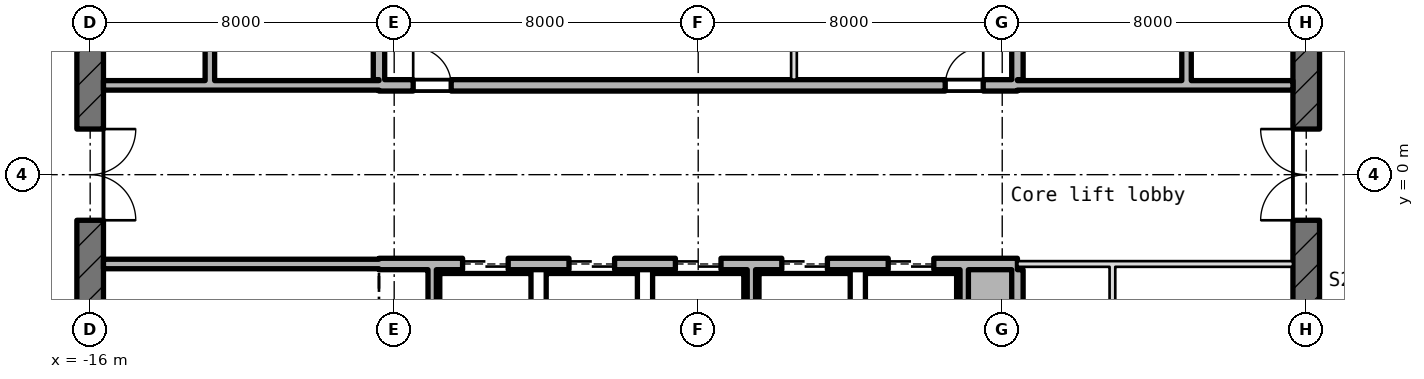
"""IFC4 building model, lengths in metres.
Left out: names, types, materials, properties, quantities, classifications, styles, units other than length and angle.
Written with IfcOpenShell. Run it as: python <this file> out.ifc"""

import sys

from ifc_helpers import new_model, si_unit, direction, frame, frame_2d, origin, place, context, subcontext, project, spatial, rectangle, extrude, element, fill, save


model = new_model("IFC4")
c1 = context("Model", 3, precision=1e-05, world=origin(), true_north=direction((0.0, 1.0)))
c2 = subcontext(c1, "Body", "Model", "MODEL_VIEW")
j1 = project(units=[si_unit("LENGTHUNIT", "METRE"), si_unit("PLANEANGLEUNIT", "RADIAN")], contexts=[c1])
p1 = place(None, origin())
s1 = spatial("IfcSite", under=j1, at=p1, CompositionType="ELEMENT")
p2 = place(p1, origin())
s2 = spatial("IfcBuilding", under=s1, at=p2, CompositionType="ELEMENT")
p3 = place(p2, frame((0.0, 0.0, 346.75)))
s3 = spatial("IfcBuildingStorey", under=s2, at=p3, CompositionType="ELEMENT", Elevation=346.75)
p4 = place(p3, frame((16.0, -10.145, -0.18), z_axis=(0.0, 0.0, 1.0), x_axis=(0.0, 1.0, 0.0)))
e1 = element("IfcWall", 1, at=p4, inside=s3, PredefinedType="SHEAR", context=c2, shape_type="SweptSolid", body=[
    extrude(rectangle(XDim=20.29, YDim=0.7, at=frame_2d((10.145, 0.0))), origin(), (0.0, 0.0, 1.0), 4.15),
])
p5 = place(p4, frame((8.945, 0.0, 0.18)))
e2 = element("IfcOpeningElement", 2, at=p5, cuts=e1, PredefinedType="OPENING", context=c2, shape_type="SweptSolid", body=[
    extrude(rectangle(XDim=2.4, YDim=2.1, at=frame_2d((1.2, 1.05))), frame((0.0, 0.36, 0.0), z_axis=(0.0, -1.0, 0.0), x_axis=(1.0, 0.0, 0.0)), (0.0, 0.0, 1.0), 0.72),
])
p6 = place(p4, frame((13.545, 0.0, 0.18)))
e3 = element("IfcOpeningElement", 3, at=p6, cuts=e1, PredefinedType="OPENING", context=c2, shape_type="SweptSolid", body=[
    extrude(rectangle(XDim=1.2, YDim=2.1, at=frame_2d((0.6, 1.05))), frame((0.0, 0.36, 0.0), z_axis=(0.0, -1.0, 0.0), x_axis=(1.0, 0.0, 0.0)), (0.0, 0.0, 1.0), 0.72),
])
p7 = place(p3, frame((-16.0, 10.145, -0.18), z_axis=(0.0, 0.0, 1.0), x_axis=(0.0, -1.0, 0.0)))
e4 = element("IfcWall", 4, at=p7, inside=s3, PredefinedType="SHEAR", context=c2, shape_type="SweptSolid", body=[
    extrude(rectangle(XDim=20.29, YDim=0.7, at=frame_2d((10.145, 0.0))), origin(), (0.0, 0.0, 1.0), 4.15),
])
p8 = place(p7, frame((8.945, 0.0, 0.18)))
e5 = element("IfcOpeningElement", 5, at=p8, cuts=e4, PredefinedType="OPENING", context=c2, shape_type="SweptSolid", body=[
    extrude(rectangle(XDim=2.4, YDim=2.1, at=frame_2d((1.2, 1.05))), frame((0.0, 0.36, 0.0), z_axis=(0.0, -1.0, 0.0), x_axis=(1.0, 0.0, 0.0)), (0.0, 0.0, 1.0), 0.72),
])
p9 = place(p7, frame((5.545, 0.0, 0.18)))
e6 = element("IfcOpeningElement", 6, at=p9, cuts=e4, PredefinedType="OPENING", context=c2, shape_type="SweptSolid", body=[
    extrude(rectangle(XDim=1.2, YDim=2.1, at=frame_2d((0.6, 1.05))), frame((0.0, 0.36, 0.0), z_axis=(0.0, -1.0, 0.0), x_axis=(1.0, 0.0, 0.0)), (0.0, 0.0, 1.0), 0.72),
])
p10 = place(p3, frame((-15.65, -2.35, 0.0), z_axis=(0.0, 0.0, 1.0), x_axis=(1.0, 0.0, 0.0)))
e7 = element("IfcWall", 7, at=p10, inside=s3, PredefinedType="STANDARD", context=c2, shape_type="SweptSolid", body=[
    extrude(rectangle(XDim=7.25, YDim=0.25, at=frame_2d((3.625, 0.0))), origin(), (0.0, 0.0, 1.0), 3.97),
])
p11 = place(p3, frame((-8.4, -2.35, -0.18), z_axis=(0.0, 0.0, 1.0), x_axis=(1.0, 0.0, 0.0)))
e8 = element("IfcWall", 8, at=p11, inside=s3, PredefinedType="SHEAR", context=c2, shape_type="SweptSolid", body=[
    extrude(rectangle(XDim=16.8, YDim=0.3, at=frame_2d((8.4, 0.0))), origin(), (0.0, 0.0, 1.0), 4.15),
])
p12 = place(p11, frame((2.2, 0.0, 0.18)))
e9 = element("IfcOpeningElement", 9, at=p12, cuts=e8, PredefinedType="OPENING", context=c2, shape_type="SweptSolid", body=[
    extrude(rectangle(XDim=1.2, YDim=2.1, at=frame_2d((0.6, 1.05))), frame((0.0, 0.16, 0.0), z_axis=(0.0, -1.0, 0.0), x_axis=(1.0, 0.0, 0.0)), (0.0, 0.0, 1.0), 0.32),
])
p13 = place(p11, frame((5.0, 0.0, 0.18)))
e10 = element("IfcOpeningElement", 10, at=p13, cuts=e8, PredefinedType="OPENING", context=c2, shape_type="SweptSolid", body=[
    extrude(rectangle(XDim=1.2, YDim=2.1, at=frame_2d((0.6, 1.05))), frame((0.0, 0.16, 0.0), z_axis=(0.0, -1.0, 0.0), x_axis=(1.0, 0.0, 0.0)), (0.0, 0.0, 1.0), 0.32),
])
p14 = place(p11, frame((7.8, 0.0, 0.18)))
e11 = element("IfcOpeningElement", 11, at=p14, cuts=e8, PredefinedType="OPENING", context=c2, shape_type="SweptSolid", body=[
    extrude(rectangle(XDim=1.2, YDim=2.1, at=frame_2d((0.6, 1.05))), frame((0.0, 0.16, 0.0), z_axis=(0.0, -1.0, 0.0), x_axis=(1.0, 0.0, 0.0)), (0.0, 0.0, 1.0), 0.32),
])
p15 = place(p11, frame((10.6, 0.0, 0.18)))
e12 = element("IfcOpeningElement", 12, at=p15, cuts=e8, PredefinedType="OPENING", context=c2, shape_type="SweptSolid", body=[
    extrude(rectangle(XDim=1.2, YDim=2.1, at=frame_2d((0.6, 1.05))), frame((0.0, 0.16, 0.0), z_axis=(0.0, -1.0, 0.0), x_axis=(1.0, 0.0, 0.0)), (0.0, 0.0, 1.0), 0.32),
])
p16 = place(p11, frame((13.4, 0.0, 0.18)))
e13 = element("IfcOpeningElement", 13, at=p16, cuts=e8, PredefinedType="OPENING", context=c2, shape_type="SweptSolid", body=[
    extrude(rectangle(XDim=1.2, YDim=2.1, at=frame_2d((0.6, 1.05))), frame((0.0, 0.16, 0.0), z_axis=(0.0, -1.0, 0.0), x_axis=(1.0, 0.0, 0.0)), (0.0, 0.0, 1.0), 0.32),
])
p17 = place(p3, frame((8.4, -2.35, 0.0), z_axis=(0.0, 0.0, 1.0), x_axis=(1.0, 0.0, 0.0)))
e14 = element("IfcWall", 14, at=p17, inside=s3, PredefinedType="PARTITIONING", context=c2, shape_type="SweptSolid", body=[
    extrude(rectangle(XDim=7.25, YDim=0.15, at=frame_2d((3.625, 0.0))), origin(), (0.0, 0.0, 1.0), 3.97),
])
p18 = place(p3, frame((-15.65, 2.35, 0.0), z_axis=(0.0, 0.0, 1.0), x_axis=(1.0, 0.0, 0.0)))
e15 = element("IfcWall", 15, at=p18, inside=s3, PredefinedType="STANDARD", context=c2, shape_type="SweptSolid", body=[
    extrude(rectangle(XDim=7.25, YDim=0.25, at=frame_2d((3.625, 0.0))), origin(), (0.0, 0.0, 1.0), 3.97),
])
p19 = place(p3, frame((-8.4, 2.35, -0.18), z_axis=(0.0, 0.0, 1.0), x_axis=(1.0, 0.0, 0.0)))
e16 = element("IfcWall", 16, at=p19, inside=s3, PredefinedType="SHEAR", context=c2, shape_type="SweptSolid", body=[
    extrude(rectangle(XDim=16.8, YDim=0.3, at=frame_2d((8.4, 0.0))), origin(), (0.0, 0.0, 1.0), 4.15),
])
p20 = place(p19, frame((0.9, 0.0, 0.18)))
e17 = element("IfcOpeningElement", 17, at=p20, cuts=e16, PredefinedType="OPENING", context=c2, shape_type="SweptSolid", body=[
    extrude(rectangle(XDim=1.0, YDim=2.1, at=frame_2d((0.5, 1.05))), frame((0.0, 0.16, 0.0), z_axis=(0.0, -1.0, 0.0), x_axis=(1.0, 0.0, 0.0)), (0.0, 0.0, 1.0), 0.32),
])
p21 = place(p19, frame((14.9, 0.0, 0.18)))
e18 = element("IfcOpeningElement", 18, at=p21, cuts=e16, PredefinedType="OPENING", context=c2, shape_type="SweptSolid", body=[
    extrude(rectangle(XDim=1.0, YDim=2.1, at=frame_2d((0.5, 1.05))), frame((0.0, 0.16, 0.0), z_axis=(0.0, -1.0, 0.0), x_axis=(1.0, 0.0, 0.0)), (0.0, 0.0, 1.0), 0.32),
])
p22 = place(p3, frame((8.4, 2.35, 0.0), z_axis=(0.0, 0.0, 1.0), x_axis=(1.0, 0.0, 0.0)))
e19 = element("IfcWall", 19, at=p22, inside=s3, PredefinedType="STANDARD", context=c2, shape_type="SweptSolid", body=[
    extrude(rectangle(XDim=7.25, YDim=0.25, at=frame_2d((3.625, 0.0))), origin(), (0.0, 0.0, 1.0), 3.97),
])
p23 = place(p3, frame((-12.85, 2.475, 0.0), z_axis=(0.0, 0.0, 1.0), x_axis=(0.0, 1.0, 0.0)))
e20 = element("IfcWall", 20, at=p23, inside=s3, PredefinedType="STANDARD", context=c2, shape_type="SweptSolid", body=[
    extrude(rectangle(XDim=3.05, YDim=0.25, at=frame_2d((1.525, 0.0))), origin(), (0.0, 0.0, 1.0), 3.97),
])
p24 = place(p3, frame((-8.4, 2.5, -0.18), z_axis=(0.0, 0.0, 1.0), x_axis=(0.0, 1.0, 0.0)))
e21 = element("IfcWall", 21, at=p24, inside=s3, PredefinedType="SHEAR", context=c2, shape_type="SweptSolid", body=[
    extrude(rectangle(XDim=5.85, YDim=0.3, at=frame_2d((2.925, 0.0))), origin(), (0.0, 0.0, 1.0), 4.15),
])
for number, where, z_axis, x_axis in (
    (22, (-7.0, -5.24, 0.0), (0.0, 0.0, 1.0), (0.0, 1.0, 0.0)),
    (23, (1.4, -5.24, 0.0), (0.0, 0.0, 1.0), (0.0, 1.0, 0.0)),
):
    element("IfcWall", number, at=place(p3, frame(where, z_axis=z_axis, x_axis=x_axis)), inside=s3, PredefinedType="STANDARD", context=c2, shape_type="SweptSolid", body=[
        extrude(rectangle(XDim=2.74, YDim=0.22, at=frame_2d((1.37, 0.0))), origin(), (0.0, 0.0, 1.0), 3.97),
    ])
p25 = place(p3, frame((2.52, 2.5, 0.0), z_axis=(0.0, 0.0, 1.0), x_axis=(0.0, 1.0, 0.0)))
e24 = element("IfcWall", 24, at=p25, inside=s3, PredefinedType="PARTITIONING", context=c2, shape_type="SweptSolid", body=[
    extrude(rectangle(XDim=2.775, YDim=0.15, at=frame_2d((1.387, 0.0))), origin(), (0.0, 0.0, 1.0), 3.97),
])
p26 = place(p3, frame((7.0, -5.24, 0.0), z_axis=(0.0, 0.0, 1.0), x_axis=(0.0, 1.0, 0.0)))
e25 = element("IfcWall", 25, at=p26, inside=s3, PredefinedType="STANDARD", context=c2, shape_type="SweptSolid", body=[
    extrude(rectangle(XDim=2.74, YDim=0.22, at=frame_2d((1.37, 0.0))), origin(), (0.0, 0.0, 1.0), 3.97),
])
for number, where, z_axis, x_axis in (
    (26, (8.4, -8.35, -0.18), (0.0, 0.0, 1.0), (0.0, 1.0, 0.0)),
    (27, (8.4, 2.5, -0.18), (0.0, 0.0, 1.0), (0.0, 1.0, 0.0)),
):
    element("IfcWall", number, at=place(p3, frame(where, z_axis=z_axis, x_axis=x_axis)), inside=s3, PredefinedType="SHEAR", context=c2, shape_type="SweptSolid", body=[
        extrude(rectangle(XDim=5.85, YDim=0.3, at=frame_2d((2.925, 0.0))), origin(), (0.0, 0.0, 1.0), 4.15),
    ])
p27 = place(p3, frame((10.9, -12.65, 0.0), z_axis=(0.0, 0.0, 1.0), x_axis=(0.0, 1.0, 0.0)))
e28 = element("IfcWall", 28, at=p27, inside=s3, PredefinedType="PARTITIONING", context=c2, shape_type="SweptSolid", body=[
    extrude(rectangle(XDim=10.225, YDim=0.15, at=frame_2d((5.112, 0.0))), origin(), (0.0, 0.0, 1.0), 3.97),
])
p28 = place(p27, frame((7.875, 0.0, 0.0)))
e29 = element("IfcOpeningElement", 29, at=p28, cuts=e28, PredefinedType="OPENING", context=c2, shape_type="SweptSolid", body=[
    extrude(rectangle(XDim=1.0, YDim=2.1, at=frame_2d((0.5, 1.05))), frame((0.0, 0.085, 0.0), z_axis=(0.0, -1.0, 0.0), x_axis=(1.0, 0.0, 0.0)), (0.0, 0.0, 1.0), 0.17),
])
p29 = place(p27, frame((2.725, 0.0, 0.0)))
e30 = element("IfcOpeningElement", 30, at=p29, cuts=e28, PredefinedType="OPENING", context=c2, shape_type="SweptSolid", body=[
    extrude(rectangle(XDim=1.0, YDim=2.1, at=frame_2d((0.5, 1.05))), frame((0.0, 0.085, 0.0), z_axis=(0.0, -1.0, 0.0), x_axis=(1.0, 0.0, 0.0)), (0.0, 0.0, 1.0), 0.17),
])
p30 = place(p3, frame((12.85, 2.475, 0.0), z_axis=(0.0, 0.0, 1.0), x_axis=(0.0, 1.0, 0.0)))
e31 = element("IfcWall", 31, at=p30, inside=s3, PredefinedType="STANDARD", context=c2, shape_type="SweptSolid", body=[
    extrude(rectangle(XDim=3.05, YDim=0.25, at=frame_2d((1.525, 0.0))), origin(), (0.0, 0.0, 1.0), 3.97),
])
p31 = place(p12, origin())
e32 = element("IfcDoor", 32, at=p31, inside=s3, OperationType="DOUBLE_DOOR_SLIDING", PredefinedType="DOOR", context=c2, shape_type="SweptSolid", body=[
    extrude(rectangle(XDim=1.2, YDim=2.1, at=frame_2d((0.6, 1.05))), frame((0.0, 0.025, 0.0), z_axis=(0.0, -1.0, 0.0), x_axis=(1.0, 0.0, 0.0)), (0.0, 0.0, 1.0), 0.05),
])
fill(e9, e32)
p32 = place(p13, origin())
e33 = element("IfcDoor", 33, at=p32, inside=s3, OperationType="DOUBLE_DOOR_SLIDING", PredefinedType="DOOR", context=c2, shape_type="SweptSolid", body=[
    extrude(rectangle(XDim=1.2, YDim=2.1, at=frame_2d((0.6, 1.05))), frame((0.0, 0.025, 0.0), z_axis=(0.0, -1.0, 0.0), x_axis=(1.0, 0.0, 0.0)), (0.0, 0.0, 1.0), 0.05),
])
fill(e10, e33)
p33 = place(p14, origin())
e34 = element("IfcDoor", 34, at=p33, inside=s3, OperationType="DOUBLE_DOOR_SLIDING", PredefinedType="DOOR", context=c2, shape_type="SweptSolid", body=[
    extrude(rectangle(XDim=1.2, YDim=2.1, at=frame_2d((0.6, 1.05))), frame((0.0, 0.025, 0.0), z_axis=(0.0, -1.0, 0.0), x_axis=(1.0, 0.0, 0.0)), (0.0, 0.0, 1.0), 0.05),
])
fill(e11, e34)
p34 = place(p15, origin())
e35 = element("IfcDoor", 35, at=p34, inside=s3, OperationType="DOUBLE_DOOR_SLIDING", PredefinedType="DOOR", context=c2, shape_type="SweptSolid", body=[
    extrude(rectangle(XDim=1.2, YDim=2.1, at=frame_2d((0.6, 1.05))), frame((0.0, 0.025, 0.0), z_axis=(0.0, -1.0, 0.0), x_axis=(1.0, 0.0, 0.0)), (0.0, 0.0, 1.0), 0.05),
])
fill(e12, e35)
p35 = place(p16, origin())
e36 = element("IfcDoor", 36, at=p35, inside=s3, OperationType="DOUBLE_DOOR_SLIDING", PredefinedType="DOOR", context=c2, shape_type="SweptSolid", body=[
    extrude(rectangle(XDim=1.2, YDim=2.1, at=frame_2d((0.6, 1.05))), frame((0.0, 0.025, 0.0), z_axis=(0.0, -1.0, 0.0), x_axis=(1.0, 0.0, 0.0)), (0.0, 0.0, 1.0), 0.05),
])
fill(e13, e36)
p36 = place(p8, origin())
e37 = element("IfcDoor", 37, at=p36, inside=s3, OperationType="DOUBLE_DOOR_SINGLE_SWING", PredefinedType="DOOR", context=c2, shape_type="SweptSolid", body=[
    extrude(rectangle(XDim=2.4, YDim=2.1, at=frame_2d((1.2, 1.05))), frame((0.0, 0.025, 0.0), z_axis=(0.0, -1.0, 0.0), x_axis=(1.0, 0.0, 0.0)), (0.0, 0.0, 1.0), 0.05),
])
fill(e5, e37)
p37 = place(p5, origin())
e38 = element("IfcDoor", 38, at=p37, inside=s3, OperationType="DOUBLE_DOOR_SINGLE_SWING", PredefinedType="DOOR", context=c2, shape_type="SweptSolid", body=[
    extrude(rectangle(XDim=2.4, YDim=2.1, at=frame_2d((1.2, 1.05))), frame((0.0, 0.025, 0.0), z_axis=(0.0, -1.0, 0.0), x_axis=(1.0, 0.0, 0.0)), (0.0, 0.0, 1.0), 0.05),
])
fill(e2, e38)
p38 = place(p20, origin())
e39 = element("IfcDoor", 39, at=p38, inside=s3, OperationType="SINGLE_SWING_RIGHT", PredefinedType="DOOR", context=c2, shape_type="SweptSolid", body=[
    extrude(rectangle(XDim=1.0, YDim=2.1, at=frame_2d((0.5, 1.05))), frame((0.0, 0.025, 0.0), z_axis=(0.0, -1.0, 0.0), x_axis=(1.0, 0.0, 0.0)), (0.0, 0.0, 1.0), 0.05),
])
fill(e17, e39)
p39 = place(p21, origin())
e40 = element("IfcDoor", 40, at=p39, inside=s3, OperationType="SINGLE_SWING_RIGHT", PredefinedType="DOOR", context=c2, shape_type="SweptSolid", body=[
    extrude(rectangle(XDim=1.0, YDim=2.1, at=frame_2d((0.5, 1.05))), frame((0.0, 0.025, 0.0), z_axis=(0.0, -1.0, 0.0), x_axis=(1.0, 0.0, 0.0)), (0.0, 0.0, 1.0), 0.05),
])
fill(e18, e40)
save(model, sys.argv[1])
